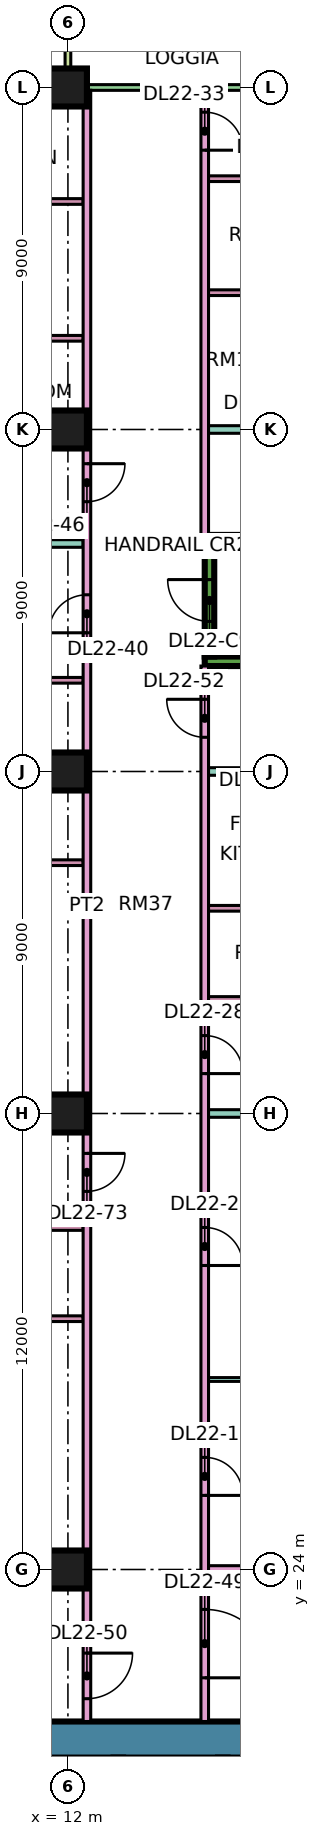
"""IFC4 building model, lengths in metres.
Left out: names, types, materials, properties, quantities, classifications, styles, units other than length and angle.
Written with IfcOpenShell. Run it as: python <this file> out.ifc"""

import sys

from ifc_helpers import new_model, si_unit, direction, frame, frame_2d, origin, origin_2d, place, context, subcontext, project, spatial, rectangle, extrude, element, fill, save


model = new_model("IFC4")
c1 = context("Model", 3, precision=1e-05, world=origin(), true_north=direction((0.0, 1.0)))
c2 = subcontext(c1, "Body", "Model", "MODEL_VIEW")
j1 = project(units=[si_unit("LENGTHUNIT", "METRE"), si_unit("PLANEANGLEUNIT", "RADIAN")], contexts=[c1])
p1 = place(None, origin())
s1 = spatial("IfcSite", under=j1, at=p1, CompositionType="ELEMENT")
p2 = place(p1, origin())
s2 = spatial("IfcBuilding", under=s1, at=p2, CompositionType="ELEMENT")
p3 = place(p2, frame((0.0, 0.0, 99.4)))
s3 = spatial("IfcBuildingStorey", under=s2, at=p3, CompositionType="ELEMENT", Elevation=99.4)
for number, where, z_axis, x_axis in (
    (1, (12.0, 24.0, 0.0), (0.0, 0.0, 1.0), (1.0, 0.0, 0.0)),
    (2, (12.0, 36.0, 0.0), (0.0, 0.0, 1.0), (1.0, 0.0, 0.0)),
    (3, (12.0, 45.0, 0.0), (0.0, 0.0, 1.0), (1.0, 0.0, 0.0)),
    (4, (12.0, 54.0, 0.0), (0.0, 0.0, 1.0), (1.0, 0.0, 0.0)),
    (5, (12.0, 63.0, 0.0), (0.0, 0.0, 1.0), (1.0, 0.0, 0.0)),
):
    element("IfcColumn", number, at=place(p3, frame(where, z_axis=z_axis, x_axis=x_axis)), inside=s3, PredefinedType="COLUMN", context=c2, shape_type="SweptSolid", body=[
        extrude(rectangle(XDim=1.0, YDim=1.0, at=origin_2d()), origin(), (0.0, 0.0, 1.0), 3.75),
    ])
p4 = place(p3, frame((9.0, 19.525, 0.0), z_axis=(0.0, 0.0, 1.0), x_axis=(1.0, 0.0, 0.0)))
e6 = element("IfcWall", 6, at=p4, inside=s3, PredefinedType="SHEAR", context=c2, shape_type="SweptSolid", body=[
    extrude(rectangle(XDim=25.0, YDim=0.95, at=frame_2d((12.5, 0.0))), origin(), (0.0, 0.0, 1.0), 3.75),
])
p5 = place(p4, frame((19.1, 0.0, 0.0)))
e7 = element("IfcOpeningElement", 7, at=p5, cuts=e6, PredefinedType="OPENING", context=c2, shape_type="SweptSolid", body=[
    extrude(rectangle(XDim=1.8, YDim=2.4, at=frame_2d((0.9, 1.2))), frame((0.0, 0.485, 0.0), z_axis=(0.0, -1.0, 0.0), x_axis=(1.0, 0.0, 0.0)), (0.0, 0.0, 1.0), 0.97),
])
for number, where, z_axis, x_axis in (
    (8, (15.6, 47.9, 0.0), (0.0, 0.0, 1.0), (1.0, 0.0, 0.0)),
    (9, (15.6, 51.1, 0.0), (0.0, 0.0, 1.0), (1.0, 0.0, 0.0)),
):
    element("IfcWall", number, at=place(p3, frame(where, z_axis=z_axis, x_axis=x_axis)), inside=s3, PredefinedType="SHEAR", context=c2, shape_type="SweptSolid", body=[
        extrude(rectangle(XDim=7.0, YDim=0.25, at=frame_2d((3.5, 0.0))), origin(), (0.0, 0.0, 1.0), 3.75),
    ])
p6 = place(p3, frame((15.725, 48.025, 0.0), z_axis=(0.0, 0.0, 1.0), x_axis=(0.0, 1.0, 0.0)))
e10 = element("IfcWall", 10, at=p6, inside=s3, PredefinedType="SHEAR", context=c2, shape_type="SweptSolid", body=[
    extrude(rectangle(XDim=2.95, YDim=0.25, at=frame_2d((1.475, 0.0))), origin(), (0.0, 0.0, 1.0), 3.75),
])
p7 = place(p6, frame((0.925, 0.0, 0.0)))
e11 = element("IfcOpeningElement", 11, at=p7, cuts=e10, PredefinedType="OPENING", context=c2, shape_type="SweptSolid", body=[
    extrude(rectangle(XDim=1.1, YDim=2.2, at=frame_2d((0.55, 1.1))), frame((0.0, 0.135, 0.0), z_axis=(0.0, -1.0, 0.0), x_axis=(1.0, 0.0, 0.0)), (0.0, 0.0, 1.0), 0.27),
])
p8 = place(p3, frame((22.425, 63.0, 0.0), z_axis=(0.0, 0.0, 1.0), x_axis=(-1.0, 0.0, 0.0)))
e12 = element("IfcWall", 12, at=p8, inside=s3, PredefinedType="SOLIDWALL", context=c2, shape_type="SweptSolid", body=[
    extrude(rectangle(XDim=10.35, YDim=0.15, at=frame_2d((5.175, 0.0))), origin(), (0.0, 0.0, 1.0), 3.35),
])
p9 = place(p8, frame((0.562, 0.0, 0.45)))
e13 = element("IfcOpeningElement", 13, at=p9, cuts=e12, PredefinedType="OPENING", context=c2, shape_type="SweptSolid", body=[
    extrude(rectangle(XDim=1.8, YDim=2.4, at=frame_2d((0.9, 1.2))), frame((0.0, 0.085, 0.0), z_axis=(0.0, -1.0, 0.0), x_axis=(1.0, 0.0, 0.0)), (0.0, 0.0, 1.0), 0.17),
])
p10 = place(p8, frame((3.975, 0.0, 0.0)))
e14 = element("IfcOpeningElement", 14, at=p10, cuts=e12, PredefinedType="OPENING", context=c2, shape_type="SweptSolid", body=[
    extrude(rectangle(XDim=1.8, YDim=2.4, at=frame_2d((0.9, 1.2))), frame((0.0, 0.085, 0.0), z_axis=(0.0, -1.0, 0.0), x_axis=(1.0, 0.0, 0.0)), (0.0, 0.0, 1.0), 0.17),
])
p11 = place(p3, frame((12.0, 64.5, 0.0), z_axis=(0.0, 0.0, 1.0), x_axis=(0.0, -1.0, 0.0)))
e15 = element("IfcWall", 15, at=p11, inside=s3, PredefinedType="SOLIDWALL", context=c2, shape_type="SweptSolid", body=[
    extrude(rectangle(XDim=1.5, YDim=0.15, at=frame_2d((0.75, 0.0))), origin(), (0.0, 0.0, 1.0), 3.35),
])
p12 = place(p3, frame((0.0, 36.0, 0.0), z_axis=(0.0, 0.0, 1.0), x_axis=(1.0, 0.0, 0.0)))
e16 = element("IfcWall", 16, at=p12, inside=s3, PredefinedType="PARTITIONING", context=c2, shape_type="SweptSolid", body=[
    extrude(rectangle(XDim=12.4, YDim=0.2, at=frame_2d((6.2, 0.0))), origin(), (0.0, 0.0, 1.0), 3.35),
])
p13 = place(p3, frame((-1.35, 51.0, 0.0), z_axis=(0.0, 0.0, 1.0), x_axis=(1.0, 0.0, 0.0)))
e17 = element("IfcWall", 17, at=p13, inside=s3, PredefinedType="PARTITIONING", context=c2, shape_type="SweptSolid", body=[
    extrude(rectangle(XDim=13.75, YDim=0.2, at=frame_2d((6.875, 0.0))), origin(), (0.0, 0.0, 1.0), 3.35),
])
p14 = place(p3, frame((0.074, 22.4, 0.0), z_axis=(0.0, 0.0, 1.0), x_axis=(1.0, 0.0, 0.0)))
e18 = element("IfcWall", 18, at=p14, inside=s3, PredefinedType="PARTITIONING", context=c2, shape_type="SweptSolid", body=[
    extrude(rectangle(XDim=12.326, YDim=0.2, at=frame_2d((6.163, 0.0))), origin(), (0.0, 0.0, 1.0), 3.35),
])
for number, where, z_axis, x_axis in (
    (19, (7.175, 30.6, 0.0), (0.0, 0.0, 1.0), (1.0, 0.0, 0.0)),
    (20, (7.175, 33.0, 0.0), (0.0, 0.0, 1.0), (1.0, 0.0, 0.0)),
    (21, (7.175, 42.6, 0.0), (0.0, 0.0, 1.0), (1.0, 0.0, 0.0)),
    (22, (7.175, 45.3, 0.0), (0.0, 0.0, 1.0), (1.0, 0.0, 0.0)),
    (23, (7.175, 47.4, 0.0), (0.0, 0.0, 1.0), (1.0, 0.0, 0.0)),
):
    element("IfcWall", number, at=place(p3, frame(where, z_axis=z_axis, x_axis=x_axis)), inside=s3, PredefinedType="PARTITIONING", context=c2, shape_type="SweptSolid", body=[
        extrude(rectangle(XDim=5.225, YDim=0.15, at=frame_2d((2.612, 0.0))), origin(), (0.0, 0.0, 1.0), 3.35),
    ])
p15 = place(p3, frame((8.375, 54.3, 0.0), z_axis=(0.0, 0.0, 1.0), x_axis=(1.0, 0.0, 0.0)))
e24 = element("IfcWall", 24, at=p15, inside=s3, PredefinedType="PARTITIONING", context=c2, shape_type="SweptSolid", body=[
    extrude(rectangle(XDim=4.025, YDim=0.15, at=frame_2d((2.012, 0.0))), origin(), (0.0, 0.0, 1.0), 3.35),
])
p16 = place(p15, frame((1.675, 0.0, 0.0)))
e25 = element("IfcOpeningElement", 25, at=p16, cuts=e24, PredefinedType="OPENING", context=c2, shape_type="SweptSolid", body=[
    extrude(rectangle(XDim=0.8, YDim=2.1, at=frame_2d((0.4, 1.05))), frame((0.0, 0.085, 0.0), z_axis=(0.0, -1.0, 0.0), x_axis=(1.0, 0.0, 0.0)), (0.0, 0.0, 1.0), 0.17),
])
for number, where, z_axis, x_axis in (
    (26, (8.375, 56.4, 0.0), (0.0, 0.0, 1.0), (1.0, 0.0, 0.0)),
    (27, (8.375, 60.0, 0.0), (0.0, 0.0, 1.0), (1.0, 0.0, 0.0)),
):
    element("IfcWall", number, at=place(p3, frame(where, z_axis=z_axis, x_axis=x_axis)), inside=s3, PredefinedType="PARTITIONING", context=c2, shape_type="SweptSolid", body=[
        extrude(rectangle(XDim=4.025, YDim=0.15, at=frame_2d((2.012, 0.0))), origin(), (0.0, 0.0, 1.0), 3.35),
    ])
p17 = place(p3, frame((12.5, 20.0, 0.0), z_axis=(0.0, 0.0, 1.0), x_axis=(0.0, 1.0, 0.0)))
e28 = element("IfcWall", 28, at=p17, inside=s3, PredefinedType="PARTITIONING", context=c2, shape_type="SweptSolid", body=[
    extrude(rectangle(XDim=42.926, YDim=0.2, at=frame_2d((21.463, 0.0))), origin(), (0.0, 0.0, 1.0), 3.35),
])
p18 = place(p17, frame((28.65, 0.0, 0.0)))
e29 = element("IfcOpeningElement", 29, at=p18, cuts=e28, PredefinedType="OPENING", context=c2, shape_type="SweptSolid", body=[
    extrude(rectangle(XDim=1.0, YDim=2.1, at=frame_2d((0.5, 1.05))), frame((0.0, 0.11, 0.0), z_axis=(0.0, -1.0, 0.0), x_axis=(1.0, 0.0, 0.0)), (0.0, 0.0, 1.0), 0.22),
])
p19 = place(p17, frame((32.1, 0.0, 0.0)))
e30 = element("IfcOpeningElement", 30, at=p19, cuts=e28, PredefinedType="OPENING", context=c2, shape_type="SweptSolid", body=[
    extrude(rectangle(XDim=1.0, YDim=2.1, at=frame_2d((0.5, 1.05))), frame((0.0, 0.11, 0.0), z_axis=(0.0, -1.0, 0.0), x_axis=(1.0, 0.0, 0.0)), (0.0, 0.0, 1.0), 0.22),
])
p20 = place(p17, frame((0.6, 0.0, 0.0)))
e31 = element("IfcOpeningElement", 31, at=p20, cuts=e28, PredefinedType="OPENING", context=c2, shape_type="SweptSolid", body=[
    extrude(rectangle(XDim=1.2, YDim=2.1, at=frame_2d((0.6, 1.05))), frame((0.0, 0.11, 0.0), z_axis=(0.0, -1.0, 0.0), x_axis=(1.0, 0.0, 0.0)), (0.0, 0.0, 1.0), 0.22),
])
p21 = place(p17, frame((13.95, 0.0, 0.0)))
e32 = element("IfcOpeningElement", 32, at=p21, cuts=e28, PredefinedType="OPENING", context=c2, shape_type="SweptSolid", body=[
    extrude(rectangle(XDim=1.0, YDim=2.1, at=frame_2d((0.5, 1.05))), frame((0.0, 0.11, 0.0), z_axis=(0.0, -1.0, 0.0), x_axis=(1.0, 0.0, 0.0)), (0.0, 0.0, 1.0), 0.22),
])
p22 = place(p3, frame((15.6, 20.0, 0.0), z_axis=(0.0, 0.0, 1.0), x_axis=(0.0, 1.0, 0.0)))
e33 = element("IfcWall", 33, at=p22, inside=s3, PredefinedType="PARTITIONING", context=c2, shape_type="SweptSolid", body=[
    extrude(rectangle(XDim=27.775, YDim=0.2, at=frame_2d((13.887, 0.0))), origin(), (0.0, 0.0, 1.0), 3.35),
])
p23 = place(p22, frame((5.95, 0.0, 0.0)))
e34 = element("IfcOpeningElement", 34, at=p23, cuts=e33, PredefinedType="OPENING", context=c2, shape_type="SweptSolid", body=[
    extrude(rectangle(XDim=1.0, YDim=2.1, at=frame_2d((0.5, 1.05))), frame((0.0, 0.11, 0.0), z_axis=(0.0, -1.0, 0.0), x_axis=(1.0, 0.0, 0.0)), (0.0, 0.0, 1.0), 0.22),
])
p24 = place(p22, frame((12.0, 0.0, 0.0)))
e35 = element("IfcOpeningElement", 35, at=p24, cuts=e33, PredefinedType="OPENING", context=c2, shape_type="SweptSolid", body=[
    extrude(rectangle(XDim=1.0, YDim=2.1, at=frame_2d((0.5, 1.05))), frame((0.0, 0.11, 0.0), z_axis=(0.0, -1.0, 0.0), x_axis=(1.0, 0.0, 0.0)), (0.0, 0.0, 1.0), 0.22),
])
p25 = place(p22, frame((17.05, 0.0, 0.0)))
e36 = element("IfcOpeningElement", 36, at=p25, cuts=e33, PredefinedType="OPENING", context=c2, shape_type="SweptSolid", body=[
    extrude(rectangle(XDim=1.0, YDim=2.1, at=frame_2d((0.5, 1.05))), frame((0.0, 0.11, 0.0), z_axis=(0.0, -1.0, 0.0), x_axis=(1.0, 0.0, 0.0)), (0.0, 0.0, 1.0), 0.22),
])
p26 = place(p22, frame((1.15, 0.0, 0.0)))
e37 = element("IfcOpeningElement", 37, at=p26, cuts=e33, PredefinedType="OPENING", context=c2, shape_type="SweptSolid", body=[
    extrude(rectangle(XDim=1.8, YDim=2.1, at=frame_2d((0.9, 1.05))), frame((0.0, 0.11, 0.0), z_axis=(0.0, -1.0, 0.0), x_axis=(1.0, 0.0, 0.0)), (0.0, 0.0, 1.0), 0.22),
])
p27 = place(p22, frame((25.9, 0.0, 0.0)))
e38 = element("IfcOpeningElement", 38, at=p27, cuts=e33, PredefinedType="OPENING", context=c2, shape_type="SweptSolid", body=[
    extrude(rectangle(XDim=1.0, YDim=2.1, at=frame_2d((0.5, 1.05))), frame((0.0, 0.11, 0.0), z_axis=(0.0, -1.0, 0.0), x_axis=(1.0, 0.0, 0.0)), (0.0, 0.0, 1.0), 0.22),
])
p28 = place(p3, frame((15.6, 51.225, 0.0), z_axis=(0.0, 0.0, 1.0), x_axis=(0.0, 1.0, 0.0)))
e39 = element("IfcWall", 39, at=p28, inside=s3, PredefinedType="PARTITIONING", context=c2, shape_type="SweptSolid", body=[
    extrude(rectangle(XDim=11.701, YDim=0.2, at=frame_2d((5.851, 0.0))), origin(), (0.0, 0.0, 1.0), 3.35),
])
p29 = place(p28, frame((10.125, 0.0, 0.0)))
e40 = element("IfcOpeningElement", 40, at=p29, cuts=e39, PredefinedType="OPENING", context=c2, shape_type="SweptSolid", body=[
    extrude(rectangle(XDim=1.0, YDim=2.1, at=frame_2d((0.5, 1.05))), frame((0.0, 0.11, 0.0), z_axis=(0.0, -1.0, 0.0), x_axis=(1.0, 0.0, 0.0)), (0.0, 0.0, 1.0), 0.22),
])
p30 = place(p3, frame((15.7, 24.0, 0.0), z_axis=(0.0, 0.0, 1.0), x_axis=(1.0, 0.0, 0.0)))
e41 = element("IfcWall", 41, at=p30, inside=s3, PredefinedType="PARTITIONING", context=c2, shape_type="SweptSolid", body=[
    extrude(rectangle(XDim=5.8, YDim=0.2, at=frame_2d((2.9, 0.0))), origin(), (0.0, 0.0, 1.0), 3.35),
])
p31 = place(p3, frame((15.7, 29.0, 0.0), z_axis=(0.0, 0.0, 1.0), x_axis=(1.0, 0.0, 0.0)))
e42 = element("IfcWall", 42, at=p31, inside=s3, PredefinedType="PARTITIONING", context=c2, shape_type="SweptSolid", body=[
    extrude(rectangle(XDim=5.8, YDim=0.1, at=frame_2d((2.9, 0.0))), origin(), (0.0, 0.0, 1.0), 3.35),
])
p32 = place(p3, frame((15.7, 36.0, 0.0), z_axis=(0.0, 0.0, 1.0), x_axis=(1.0, 0.0, 0.0)))
e43 = element("IfcWall", 43, at=p32, inside=s3, PredefinedType="PARTITIONING", context=c2, shape_type="SweptSolid", body=[
    extrude(rectangle(XDim=8.3, YDim=0.2, at=frame_2d((4.15, 0.0))), origin(), (0.0, 0.0, 1.0), 3.35),
])
for number, where, z_axis, x_axis in (
    (44, (15.7, 39.0, 0.0), (0.0, 0.0, 1.0), (1.0, 0.0, 0.0)),
    (45, (15.7, 41.4, 0.0), (0.0, 0.0, 1.0), (1.0, 0.0, 0.0)),
):
    element("IfcWall", number, at=place(p3, frame(where, z_axis=z_axis, x_axis=x_axis)), inside=s3, PredefinedType="PARTITIONING", context=c2, shape_type="SweptSolid", body=[
        extrude(rectangle(XDim=2.825, YDim=0.15, at=frame_2d((1.413, 0.0))), origin(), (0.0, 0.0, 1.0), 3.35),
    ])
p33 = place(p3, frame((15.7, 45.0, 0.0), z_axis=(0.0, 0.0, 1.0), x_axis=(1.0, 0.0, 0.0)))
e46 = element("IfcWall", 46, at=p33, inside=s3, PredefinedType="PARTITIONING", context=c2, shape_type="SweptSolid", body=[
    extrude(rectangle(XDim=8.226, YDim=0.2, at=frame_2d((4.113, 0.0))), origin(), (0.0, 0.0, 1.0), 3.35),
])
p34 = place(p3, frame((15.7, 54.0, 0.0), z_axis=(0.0, 0.0, 1.0), x_axis=(1.0, 0.0, 0.0)))
e47 = element("IfcWall", 47, at=p34, inside=s3, PredefinedType="PARTITIONING", context=c2, shape_type="SweptSolid", body=[
    extrude(rectangle(XDim=8.3, YDim=0.2, at=frame_2d((4.15, 0.0))), origin(), (0.0, 0.0, 1.0), 3.35),
])
for number, where, z_axis, x_axis in (
    (48, (15.7, 57.6, 0.0), (0.0, 0.0, 1.0), (1.0, 0.0, 0.0)),
    (49, (15.7, 60.6, 0.0), (0.0, 0.0, 1.0), (1.0, 0.0, 0.0)),
):
    element("IfcWall", number, at=place(p3, frame(where, z_axis=z_axis, x_axis=x_axis)), inside=s3, PredefinedType="PARTITIONING", context=c2, shape_type="SweptSolid", body=[
        extrude(rectangle(XDim=2.525, YDim=0.15, at=frame_2d((1.263, 0.0))), origin(), (0.0, 0.0, 1.0), 3.35),
    ])
p35 = place(p7, frame((1.1, 0.0, 0.0), z_axis=(0.0, 0.0, 1.0), x_axis=(-1.0, 0.0, 0.0)))
e50 = element("IfcDoor", 50, at=p35, inside=s3, OperationType="SINGLE_SWING_RIGHT", PredefinedType="DOOR", context=c2, shape_type="SweptSolid", body=[
    extrude(rectangle(XDim=1.1, YDim=2.2, at=frame_2d((0.55, 1.1))), frame((0.0, 0.025, 0.0), z_axis=(0.0, -1.0, 0.0), x_axis=(1.0, 0.0, 0.0)), (0.0, 0.0, 1.0), 0.05),
])
fill(e11, e50)
p36 = place(p23, frame((1.0, 0.0, 0.0), z_axis=(0.0, 0.0, 1.0), x_axis=(-1.0, 0.0, 0.0)))
e51 = element("IfcDoor", 51, at=p36, inside=s3, OperationType="SINGLE_SWING_LEFT", PredefinedType="DOOR", context=c2, shape_type="SweptSolid", body=[
    extrude(rectangle(XDim=1.0, YDim=2.1, at=frame_2d((0.5, 1.05))), frame((0.0, 0.025, 0.0), z_axis=(0.0, -1.0, 0.0), x_axis=(1.0, 0.0, 0.0)), (0.0, 0.0, 1.0), 0.05),
])
fill(e34, e51)
p37 = place(p24, frame((1.0, 0.0, 0.0), z_axis=(0.0, 0.0, 1.0), x_axis=(-1.0, 0.0, 0.0)))
e52 = element("IfcDoor", 52, at=p37, inside=s3, OperationType="SINGLE_SWING_LEFT", PredefinedType="DOOR", context=c2, shape_type="SweptSolid", body=[
    extrude(rectangle(XDim=1.0, YDim=2.1, at=frame_2d((0.5, 1.05))), frame((0.0, 0.025, 0.0), z_axis=(0.0, -1.0, 0.0), x_axis=(1.0, 0.0, 0.0)), (0.0, 0.0, 1.0), 0.05),
])
fill(e35, e52)
p38 = place(p25, frame((1.0, 0.0, 0.0), z_axis=(0.0, 0.0, 1.0), x_axis=(-1.0, 0.0, 0.0)))
e53 = element("IfcDoor", 53, at=p38, inside=s3, OperationType="SINGLE_SWING_LEFT", PredefinedType="DOOR", context=c2, shape_type="SweptSolid", body=[
    extrude(rectangle(XDim=1.0, YDim=2.1, at=frame_2d((0.5, 1.05))), frame((0.0, 0.025, 0.0), z_axis=(0.0, -1.0, 0.0), x_axis=(1.0, 0.0, 0.0)), (0.0, 0.0, 1.0), 0.05),
])
fill(e36, e53)
p39 = place(p29, frame((1.0, 0.0, 0.0), z_axis=(0.0, 0.0, 1.0), x_axis=(-1.0, 0.0, 0.0)))
e54 = element("IfcDoor", 54, at=p39, inside=s3, OperationType="SINGLE_SWING_LEFT", PredefinedType="DOOR", context=c2, shape_type="SweptSolid", body=[
    extrude(rectangle(XDim=1.0, YDim=2.1, at=frame_2d((0.5, 1.05))), frame((0.0, 0.025, 0.0), z_axis=(0.0, -1.0, 0.0), x_axis=(1.0, 0.0, 0.0)), (0.0, 0.0, 1.0), 0.05),
])
fill(e40, e54)
p40 = place(p18, origin())
e55 = element("IfcDoor", 55, at=p40, inside=s3, OperationType="SINGLE_SWING_LEFT", PredefinedType="DOOR", context=c2, shape_type="SweptSolid", body=[
    extrude(rectangle(XDim=1.0, YDim=2.1, at=frame_2d((0.5, 1.05))), frame((0.0, 0.025, 0.0), z_axis=(0.0, -1.0, 0.0), x_axis=(1.0, 0.0, 0.0)), (0.0, 0.0, 1.0), 0.05),
])
fill(e29, e55)
p41 = place(p19, origin())
e56 = element("IfcDoor", 56, at=p41, inside=s3, OperationType="SINGLE_SWING_RIGHT", PredefinedType="DOOR", context=c2, shape_type="SweptSolid", body=[
    extrude(rectangle(XDim=1.0, YDim=2.1, at=frame_2d((0.5, 1.05))), frame((0.0, 0.025, 0.0), z_axis=(0.0, -1.0, 0.0), x_axis=(1.0, 0.0, 0.0)), (0.0, 0.0, 1.0), 0.05),
])
fill(e30, e56)
p42 = place(p26, frame((1.8, 0.0, 0.0), z_axis=(0.0, 0.0, 1.0), x_axis=(-1.0, 0.0, 0.0)))
e57 = element("IfcDoor", 57, at=p42, inside=s3, OperationType="DOUBLE_DOOR_SINGLE_SWING", PredefinedType="DOOR", context=c2, shape_type="SweptSolid", body=[
    extrude(rectangle(XDim=1.8, YDim=2.1, at=frame_2d((0.9, 1.05))), frame((0.0, 0.025, 0.0), z_axis=(0.0, -1.0, 0.0), x_axis=(1.0, 0.0, 0.0)), (0.0, 0.0, 1.0), 0.05),
])
fill(e37, e57)
p43 = place(p20, origin())
e58 = element("IfcDoor", 58, at=p43, inside=s3, OperationType="SINGLE_SWING_RIGHT", PredefinedType="DOOR", context=c2, shape_type="SweptSolid", body=[
    extrude(rectangle(XDim=1.2, YDim=2.1, at=frame_2d((0.6, 1.05))), frame((0.0, 0.025, 0.0), z_axis=(0.0, -1.0, 0.0), x_axis=(1.0, 0.0, 0.0)), (0.0, 0.0, 1.0), 0.05),
])
fill(e31, e58)
p44 = place(p27, frame((1.0, 0.0, 0.0), z_axis=(0.0, 0.0, 1.0), x_axis=(-1.0, 0.0, 0.0)))
e59 = element("IfcDoor", 59, at=p44, inside=s3, OperationType="SINGLE_SWING_RIGHT", PredefinedType="DOOR", context=c2, shape_type="SweptSolid", body=[
    extrude(rectangle(XDim=1.0, YDim=2.1, at=frame_2d((0.5, 1.05))), frame((0.0, 0.025, 0.0), z_axis=(0.0, -1.0, 0.0), x_axis=(1.0, 0.0, 0.0)), (0.0, 0.0, 1.0), 0.05),
])
fill(e38, e59)
p45 = place(p21, origin())
e60 = element("IfcDoor", 60, at=p45, inside=s3, OperationType="SINGLE_SWING_RIGHT", PredefinedType="DOOR", context=c2, shape_type="SweptSolid", body=[
    extrude(rectangle(XDim=1.0, YDim=2.1, at=frame_2d((0.5, 1.05))), frame((0.0, 0.025, 0.0), z_axis=(0.0, -1.0, 0.0), x_axis=(1.0, 0.0, 0.0)), (0.0, 0.0, 1.0), 0.05),
])
fill(e32, e60)
save(model, sys.argv[1])
